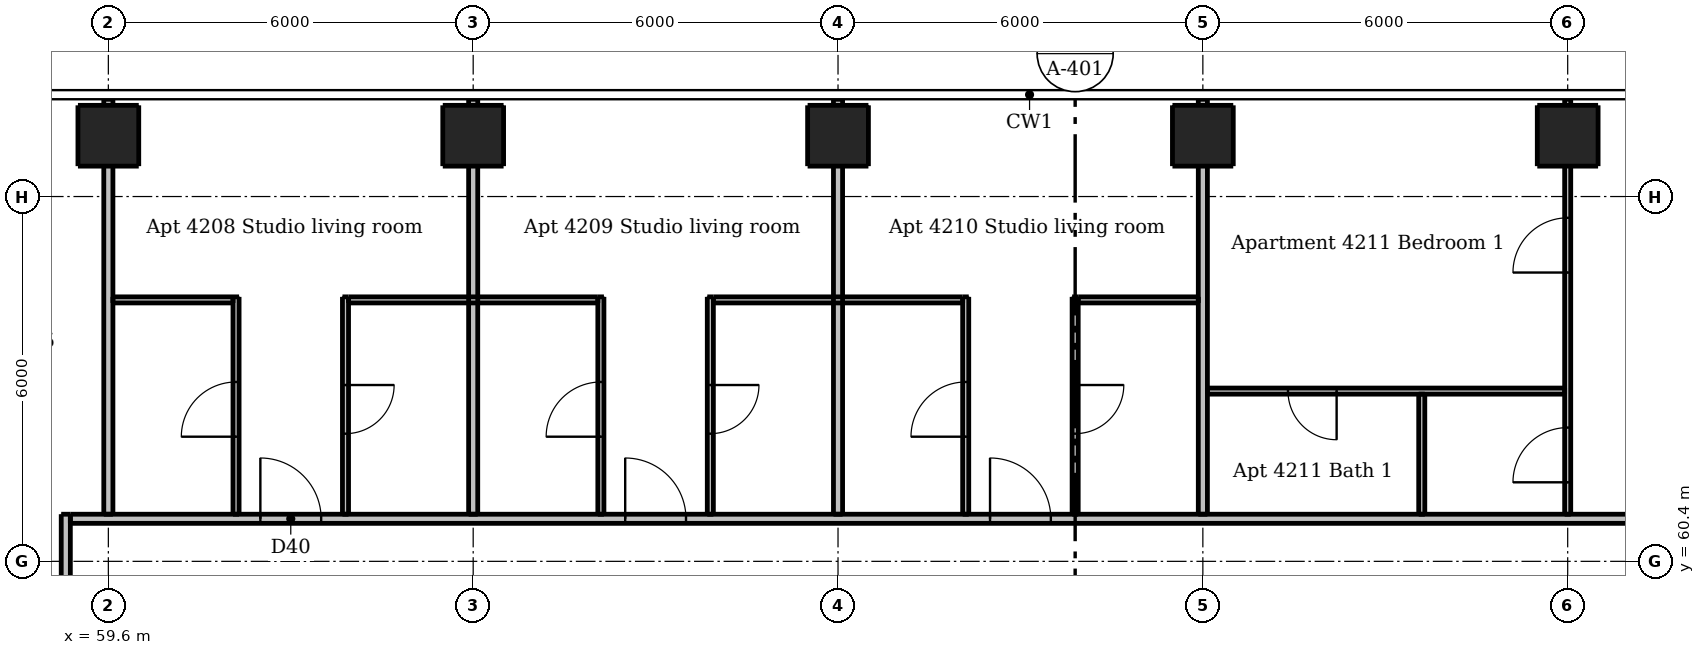
"""IFC4 building model, lengths in metres.
Left out: names, types, materials, properties, quantities, classifications, styles, units other than length and angle.
Written with IfcOpenShell. Run it as: python <this file> out.ifc"""

import sys

from ifc_helpers import new_model, si_unit, direction, frame, frame_2d, origin, origin_2d, place, context, subcontext, project, spatial, rectangle, extrude, element, fill, save


model = new_model("IFC4")
c1 = context("Model", 3, precision=1e-05, world=origin(), true_north=direction((0.0, 1.0)))
c2 = subcontext(c1, "Body", "Model", "MODEL_VIEW")
j1 = project(units=[si_unit("LENGTHUNIT", "METRE"), si_unit("PLANEANGLEUNIT", "RADIAN")], contexts=[c1])
p1 = place(None, origin())
s1 = spatial("IfcSite", under=j1, at=p1, CompositionType="ELEMENT")
p2 = place(p1, origin())
s2 = spatial("IfcBuilding", under=s1, at=p2, CompositionType="ELEMENT")
p3 = place(p2, frame((0.0, 0.0, 158.2)))
s3 = spatial("IfcBuildingStorey", under=s2, at=p3, CompositionType="ELEMENT", Elevation=158.2)
for number, where, z_axis, x_axis in (
    (1, (59.6, 67.4, 0.0), (0.0, 0.0, 1.0), (1.0, 0.0, 0.0)),
    (2, (65.6, 67.4, 0.0), (0.0, 0.0, 1.0), (1.0, 0.0, 0.0)),
    (3, (71.6, 67.4, 0.0), (0.0, 0.0, 1.0), (1.0, 0.0, 0.0)),
    (4, (77.6, 67.4, 0.0), (0.0, 0.0, 1.0), (1.0, 0.0, 0.0)),
    (5, (83.6, 67.4, 0.0), (0.0, 0.0, 1.0), (1.0, 0.0, 0.0)),
):
    element("IfcColumn", number, at=place(p3, frame(where, z_axis=z_axis, x_axis=x_axis)), inside=s3, PredefinedType="COLUMN", context=c2, shape_type="SweptSolid", body=[
        extrude(rectangle(XDim=1.0, YDim=1.0, at=origin_2d()), origin(), (0.0, 0.0, 1.0), 3.05),
    ])
p4 = place(p3, frame((61.7, 61.175, 0.0), z_axis=(0.0, 0.0, 1.0), x_axis=(0.0, 1.0, 0.0)))
e6 = element("IfcWall", 6, at=p4, inside=s3, PredefinedType="PARTITIONING", context=c2, shape_type="SweptSolid", body=[
    extrude(rectangle(XDim=3.575, YDim=0.1, at=frame_2d((1.788, 0.0))), origin(), (0.0, 0.0, 1.0), 3.05),
])
p5 = place(p4, frame((1.275, 0.0, 0.0)))
e7 = element("IfcOpeningElement", 7, at=p5, cuts=e6, PredefinedType="OPENING", context=c2, shape_type="SweptSolid", body=[
    extrude(rectangle(XDim=0.9, YDim=2.1, at=frame_2d((0.45, 1.05))), frame((0.0, 0.06, 0.0), z_axis=(0.0, -1.0, 0.0), x_axis=(1.0, 0.0, 0.0)), (0.0, 0.0, 1.0), 0.12),
])
p6 = place(p3, frame((63.5, 64.75, 0.0), z_axis=(0.0, 0.0, 1.0), x_axis=(0.0, -1.0, 0.0)))
e8 = element("IfcWall", 8, at=p6, inside=s3, PredefinedType="PARTITIONING", context=c2, shape_type="SweptSolid", body=[
    extrude(rectangle(XDim=3.575, YDim=0.1, at=frame_2d((1.788, 0.0))), origin(), (0.0, 0.0, 1.0), 3.05),
])
p7 = place(p6, frame((1.45, 0.0, 0.0)))
e9 = element("IfcOpeningElement", 9, at=p7, cuts=e8, PredefinedType="OPENING", context=c2, shape_type="SweptSolid", body=[
    extrude(rectangle(XDim=0.8, YDim=2.1, at=frame_2d((0.4, 1.05))), frame((0.0, 0.06, 0.0), z_axis=(0.0, -1.0, 0.0), x_axis=(1.0, 0.0, 0.0)), (0.0, 0.0, 1.0), 0.12),
])
p8 = place(p3, frame((67.7, 61.175, 0.0), z_axis=(0.0, 0.0, 1.0), x_axis=(0.0, 1.0, 0.0)))
e10 = element("IfcWall", 10, at=p8, inside=s3, PredefinedType="PARTITIONING", context=c2, shape_type="SweptSolid", body=[
    extrude(rectangle(XDim=3.575, YDim=0.1, at=frame_2d((1.788, 0.0))), origin(), (0.0, 0.0, 1.0), 3.05),
])
p9 = place(p8, frame((1.275, 0.0, 0.0)))
e11 = element("IfcOpeningElement", 11, at=p9, cuts=e10, PredefinedType="OPENING", context=c2, shape_type="SweptSolid", body=[
    extrude(rectangle(XDim=0.9, YDim=2.1, at=frame_2d((0.45, 1.05))), frame((0.0, 0.06, 0.0), z_axis=(0.0, -1.0, 0.0), x_axis=(1.0, 0.0, 0.0)), (0.0, 0.0, 1.0), 0.12),
])
p10 = place(p3, frame((69.5, 64.75, 0.0), z_axis=(0.0, 0.0, 1.0), x_axis=(0.0, -1.0, 0.0)))
e12 = element("IfcWall", 12, at=p10, inside=s3, PredefinedType="PARTITIONING", context=c2, shape_type="SweptSolid", body=[
    extrude(rectangle(XDim=3.575, YDim=0.1, at=frame_2d((1.788, 0.0))), origin(), (0.0, 0.0, 1.0), 3.05),
])
p11 = place(p10, frame((1.45, 0.0, 0.0)))
e13 = element("IfcOpeningElement", 13, at=p11, cuts=e12, PredefinedType="OPENING", context=c2, shape_type="SweptSolid", body=[
    extrude(rectangle(XDim=0.8, YDim=2.1, at=frame_2d((0.4, 1.05))), frame((0.0, 0.06, 0.0), z_axis=(0.0, -1.0, 0.0), x_axis=(1.0, 0.0, 0.0)), (0.0, 0.0, 1.0), 0.12),
])
p12 = place(p3, frame((73.7, 61.175, 0.0), z_axis=(0.0, 0.0, 1.0), x_axis=(0.0, 1.0, 0.0)))
e14 = element("IfcWall", 14, at=p12, inside=s3, PredefinedType="PARTITIONING", context=c2, shape_type="SweptSolid", body=[
    extrude(rectangle(XDim=3.575, YDim=0.1, at=frame_2d((1.788, 0.0))), origin(), (0.0, 0.0, 1.0), 3.05),
])
p13 = place(p12, frame((1.275, 0.0, 0.0)))
e15 = element("IfcOpeningElement", 15, at=p13, cuts=e14, PredefinedType="OPENING", context=c2, shape_type="SweptSolid", body=[
    extrude(rectangle(XDim=0.9, YDim=2.1, at=frame_2d((0.45, 1.05))), frame((0.0, 0.06, 0.0), z_axis=(0.0, -1.0, 0.0), x_axis=(1.0, 0.0, 0.0)), (0.0, 0.0, 1.0), 0.12),
])
p14 = place(p3, frame((75.5, 64.75, 0.0), z_axis=(0.0, 0.0, 1.0), x_axis=(0.0, -1.0, 0.0)))
e16 = element("IfcWall", 16, at=p14, inside=s3, PredefinedType="PARTITIONING", context=c2, shape_type="SweptSolid", body=[
    extrude(rectangle(XDim=3.575, YDim=0.1, at=frame_2d((1.788, 0.0))), origin(), (0.0, 0.0, 1.0), 3.05),
])
p15 = place(p14, frame((1.45, 0.0, 0.0)))
e17 = element("IfcOpeningElement", 17, at=p15, cuts=e16, PredefinedType="OPENING", context=c2, shape_type="SweptSolid", body=[
    extrude(rectangle(XDim=0.8, YDim=2.1, at=frame_2d((0.4, 1.05))), frame((0.0, 0.06, 0.0), z_axis=(0.0, -1.0, 0.0), x_axis=(1.0, 0.0, 0.0)), (0.0, 0.0, 1.0), 0.12),
])
p16 = place(p3, frame((81.2, 61.175, 0.0), z_axis=(0.0, 0.0, 1.0), x_axis=(0.0, 1.0, 0.0)))
e18 = element("IfcWall", 18, at=p16, inside=s3, PredefinedType="PARTITIONING", context=c2, shape_type="SweptSolid", body=[
    extrude(rectangle(XDim=1.975, YDim=0.1, at=frame_2d((0.987, 0.0))), origin(), (0.0, 0.0, 1.0), 3.05),
])
p17 = place(p3, frame((83.6, 61.175, 0.0), z_axis=(0.0, 0.0, 1.0), x_axis=(0.0, 1.0, 0.0)))
e19 = element("IfcWall", 19, at=p17, inside=s3, PredefinedType="PARTITIONING", context=c2, shape_type="SweptSolid", body=[
    extrude(rectangle(XDim=6.825, YDim=0.1, at=frame_2d((3.413, 0.0))), origin(), (0.0, 0.0, 1.0), 2.516),
])
p18 = place(p17, frame((0.525, 0.0, 0.0)))
e20 = element("IfcOpeningElement", 20, at=p18, cuts=e19, PredefinedType="OPENING", context=c2, shape_type="SweptSolid", body=[
    extrude(rectangle(XDim=0.9, YDim=2.1, at=frame_2d((0.45, 1.05))), frame((0.0, 0.06, 0.0), z_axis=(0.0, -1.0, 0.0), x_axis=(1.0, 0.0, 0.0)), (0.0, 0.0, 1.0), 0.12),
])
p19 = place(p17, frame((3.975, 0.0, 0.0)))
e21 = element("IfcOpeningElement", 21, at=p19, cuts=e19, PredefinedType="OPENING", context=c2, shape_type="SweptSolid", body=[
    extrude(rectangle(XDim=0.9, YDim=2.1, at=frame_2d((0.45, 1.05))), frame((0.0, 0.06, 0.0), z_axis=(0.0, -1.0, 0.0), x_axis=(1.0, 0.0, 0.0)), (0.0, 0.0, 1.0), 0.12),
])
p20 = place(p3, frame((59.675, 64.7, 0.0), z_axis=(0.0, 0.0, 1.0), x_axis=(1.0, 0.0, 0.0)))
e22 = element("IfcWall", 22, at=p20, inside=s3, PredefinedType="PARTITIONING", context=c2, shape_type="SweptSolid", body=[
    extrude(rectangle(XDim=1.975, YDim=0.1, at=frame_2d((0.987, 0.0))), origin(), (0.0, 0.0, 1.0), 3.05),
])
for number, where, z_axis, x_axis in (
    (23, (63.55, 64.7, 0.0), (0.0, 0.0, 1.0), (1.0, 0.0, 0.0)),
    (24, (69.55, 64.7, 0.0), (0.0, 0.0, 1.0), (1.0, 0.0, 0.0)),
):
    element("IfcWall", number, at=place(p3, frame(where, z_axis=z_axis, x_axis=x_axis)), inside=s3, PredefinedType="PARTITIONING", context=c2, shape_type="SweptSolid", body=[
        extrude(rectangle(XDim=4.1, YDim=0.1, at=frame_2d((2.05, 0.0))), origin(), (0.0, 0.0, 1.0), 3.05),
    ])
p21 = place(p3, frame((75.55, 64.7, 0.0), z_axis=(0.0, 0.0, 1.0), x_axis=(1.0, 0.0, 0.0)))
e25 = element("IfcWall", 25, at=p21, inside=s3, PredefinedType="PARTITIONING", context=c2, shape_type="SweptSolid", body=[
    extrude(rectangle(XDim=1.975, YDim=0.1, at=frame_2d((0.987, 0.0))), origin(), (0.0, 0.0, 1.0), 3.05),
])
p22 = place(p3, frame((83.55, 63.2, 0.0), z_axis=(0.0, 0.0, 1.0), x_axis=(-1.0, 0.0, 0.0)))
e26 = element("IfcWall", 26, at=p22, inside=s3, PredefinedType="PARTITIONING", context=c2, shape_type="SweptSolid", body=[
    extrude(rectangle(XDim=5.875, YDim=0.1, at=frame_2d((2.938, 0.0))), origin(), (0.0, 0.0, 1.0), 3.05),
])
p23 = place(p22, frame((3.75, 0.0, 0.0)))
e27 = element("IfcOpeningElement", 27, at=p23, cuts=e26, PredefinedType="OPENING", context=c2, shape_type="SweptSolid", body=[
    extrude(rectangle(XDim=0.8, YDim=2.1, at=frame_2d((0.4, 1.05))), frame((0.0, 0.06, 0.0), z_axis=(0.0, -1.0, 0.0), x_axis=(1.0, 0.0, 0.0)), (0.0, 0.0, 1.0), 0.12),
])
p24 = place(p3, frame((58.9, 30.325, 0.0), z_axis=(0.0, 0.0, 1.0), x_axis=(0.0, 1.0, 0.0)))
e28 = element("IfcWall", 28, at=p24, inside=s3, PredefinedType="PARTITIONING", context=c2, shape_type="SweptSolid", body=[
    extrude(rectangle(XDim=30.85, YDim=0.15, at=frame_2d((15.425, 0.0))), origin(), (0.0, 0.0, 1.0), 3.05),
])
p25 = place(p24, frame((2.575, 0.0, 0.0)))
e29 = element("IfcOpeningElement", 29, at=p25, cuts=e28, PredefinedType="OPENING", context=c2, shape_type="SweptSolid", body=[
    extrude(rectangle(XDim=1.0, YDim=2.1, at=frame_2d((0.5, 1.05))), frame((0.0, 0.085, 0.0), z_axis=(0.0, -1.0, 0.0), x_axis=(1.0, 0.0, 0.0)), (0.0, 0.0, 1.0), 0.17),
])
p26 = place(p24, frame((8.575, 0.0, 0.0)))
e30 = element("IfcOpeningElement", 30, at=p26, cuts=e28, PredefinedType="OPENING", context=c2, shape_type="SweptSolid", body=[
    extrude(rectangle(XDim=1.0, YDim=2.1, at=frame_2d((0.5, 1.05))), frame((0.0, 0.085, 0.0), z_axis=(0.0, -1.0, 0.0), x_axis=(1.0, 0.0, 0.0)), (0.0, 0.0, 1.0), 0.17),
])
p27 = place(p24, frame((14.575, 0.0, 0.0)))
e31 = element("IfcOpeningElement", 31, at=p27, cuts=e28, PredefinedType="OPENING", context=c2, shape_type="SweptSolid", body=[
    extrude(rectangle(XDim=1.0, YDim=2.1, at=frame_2d((0.5, 1.05))), frame((0.0, 0.085, 0.0), z_axis=(0.0, -1.0, 0.0), x_axis=(1.0, 0.0, 0.0)), (0.0, 0.0, 1.0), 0.17),
])
p28 = place(p24, frame((26.925, 0.0, 0.0)))
e32 = element("IfcOpeningElement", 32, at=p28, cuts=e28, PredefinedType="OPENING", context=c2, shape_type="SweptSolid", body=[
    extrude(rectangle(XDim=1.0, YDim=2.1, at=frame_2d((0.5, 1.05))), frame((0.0, 0.085, 0.0), z_axis=(0.0, -1.0, 0.0), x_axis=(1.0, 0.0, 0.0)), (0.0, 0.0, 1.0), 0.17),
])
p29 = place(p3, frame((59.6, 61.175, 0.0), z_axis=(0.0, 0.0, 1.0), x_axis=(0.0, 1.0, 0.0)))
e33 = element("IfcWall", 33, at=p29, inside=s3, PredefinedType="PARTITIONING", context=c2, shape_type="SweptSolid", body=[
    extrude(rectangle(XDim=6.825, YDim=0.15, at=frame_2d((3.413, 0.0))), origin(), (0.0, 0.0, 1.0), 2.51),
])
for number, where, z_axis, x_axis in (
    (34, (65.6, 61.175, 0.0), (0.0, 0.0, 1.0), (0.0, 1.0, 0.0)),
    (35, (71.6, 61.175, 0.0), (0.0, 0.0, 1.0), (0.0, 1.0, 0.0)),
    (36, (77.6, 61.175, 0.0), (0.0, 0.0, 1.0), (0.0, 1.0, 0.0)),
):
    element("IfcWall", number, at=place(p3, frame(where, z_axis=z_axis, x_axis=x_axis)), inside=s3, PredefinedType="PARTITIONING", context=c2, shape_type="SweptSolid", body=[
        extrude(rectangle(XDim=6.825, YDim=0.15, at=frame_2d((3.413, 0.0))), origin(), (0.0, 0.0, 1.0), 2.516),
    ])
p30 = place(p3, frame((58.975, 61.1, 0.0), z_axis=(0.0, 0.0, 1.0), x_axis=(1.0, 0.0, 0.0)))
e37 = element("IfcWall", 37, at=p30, inside=s3, PredefinedType="PARTITIONING", context=c2, shape_type="SweptSolid", body=[
    extrude(rectangle(XDim=29.25, YDim=0.15, at=frame_2d((14.625, 0.0))), origin(), (0.0, 0.0, 1.0), 3.05),
])
p31 = place(p30, frame((3.125, 0.0, 0.0)))
e38 = element("IfcOpeningElement", 38, at=p31, cuts=e37, PredefinedType="OPENING", context=c2, shape_type="SweptSolid", body=[
    extrude(rectangle(XDim=1.0, YDim=2.1, at=frame_2d((0.5, 1.05))), frame((0.0, 0.085, 0.0), z_axis=(0.0, -1.0, 0.0), x_axis=(1.0, 0.0, 0.0)), (0.0, 0.0, 1.0), 0.17),
])
p32 = place(p30, frame((9.125, 0.0, 0.0)))
e39 = element("IfcOpeningElement", 39, at=p32, cuts=e37, PredefinedType="OPENING", context=c2, shape_type="SweptSolid", body=[
    extrude(rectangle(XDim=1.0, YDim=2.1, at=frame_2d((0.5, 1.05))), frame((0.0, 0.085, 0.0), z_axis=(0.0, -1.0, 0.0), x_axis=(1.0, 0.0, 0.0)), (0.0, 0.0, 1.0), 0.17),
])
p33 = place(p30, frame((15.125, 0.0, 0.0)))
e40 = element("IfcOpeningElement", 40, at=p33, cuts=e37, PredefinedType="OPENING", context=c2, shape_type="SweptSolid", body=[
    extrude(rectangle(XDim=1.0, YDim=2.1, at=frame_2d((0.5, 1.05))), frame((0.0, 0.085, 0.0), z_axis=(0.0, -1.0, 0.0), x_axis=(1.0, 0.0, 0.0)), (0.0, 0.0, 1.0), 0.17),
])
p34 = place(p30, frame((26.475, 0.0, 0.0)))
e41 = element("IfcOpeningElement", 41, at=p34, cuts=e37, PredefinedType="OPENING", context=c2, shape_type="SweptSolid", body=[
    extrude(rectangle(XDim=1.0, YDim=2.1, at=frame_2d((0.5, 1.05))), frame((0.0, 0.085, 0.0), z_axis=(0.0, -1.0, 0.0), x_axis=(1.0, 0.0, 0.0)), (0.0, 0.0, 1.0), 0.17),
])
p35 = place(p31, origin())
e42 = element("IfcDoor", 42, at=p35, inside=s3, OperationType="SINGLE_SWING_LEFT", PredefinedType="DOOR", context=c2, shape_type="SweptSolid", body=[
    extrude(rectangle(XDim=1.0, YDim=2.1, at=frame_2d((0.5, 1.05))), frame((0.0, 0.025, 0.0), z_axis=(0.0, -1.0, 0.0), x_axis=(1.0, 0.0, 0.0)), (0.0, 0.0, 1.0), 0.05),
])
fill(e38, e42)
p36 = place(p5, origin())
e43 = element("IfcDoor", 43, at=p36, inside=s3, OperationType="SINGLE_SWING_LEFT", PredefinedType="DOOR", context=c2, shape_type="SweptSolid", body=[
    extrude(rectangle(XDim=0.9, YDim=2.1, at=frame_2d((0.45, 1.05))), frame((0.0, 0.025, 0.0), z_axis=(0.0, -1.0, 0.0), x_axis=(1.0, 0.0, 0.0)), (0.0, 0.0, 1.0), 0.05),
])
fill(e7, e43)
p37 = place(p7, origin())
e44 = element("IfcDoor", 44, at=p37, inside=s3, OperationType="SINGLE_SWING_LEFT", PredefinedType="DOOR", context=c2, shape_type="SweptSolid", body=[
    extrude(rectangle(XDim=0.8, YDim=2.1, at=frame_2d((0.4, 1.05))), frame((0.0, 0.025, 0.0), z_axis=(0.0, -1.0, 0.0), x_axis=(1.0, 0.0, 0.0)), (0.0, 0.0, 1.0), 0.05),
])
fill(e9, e44)
p38 = place(p32, origin())
e45 = element("IfcDoor", 45, at=p38, inside=s3, OperationType="SINGLE_SWING_LEFT", PredefinedType="DOOR", context=c2, shape_type="SweptSolid", body=[
    extrude(rectangle(XDim=1.0, YDim=2.1, at=frame_2d((0.5, 1.05))), frame((0.0, 0.025, 0.0), z_axis=(0.0, -1.0, 0.0), x_axis=(1.0, 0.0, 0.0)), (0.0, 0.0, 1.0), 0.05),
])
fill(e39, e45)
p39 = place(p9, origin())
e46 = element("IfcDoor", 46, at=p39, inside=s3, OperationType="SINGLE_SWING_LEFT", PredefinedType="DOOR", context=c2, shape_type="SweptSolid", body=[
    extrude(rectangle(XDim=0.9, YDim=2.1, at=frame_2d((0.45, 1.05))), frame((0.0, 0.025, 0.0), z_axis=(0.0, -1.0, 0.0), x_axis=(1.0, 0.0, 0.0)), (0.0, 0.0, 1.0), 0.05),
])
fill(e11, e46)
p40 = place(p11, origin())
e47 = element("IfcDoor", 47, at=p40, inside=s3, OperationType="SINGLE_SWING_LEFT", PredefinedType="DOOR", context=c2, shape_type="SweptSolid", body=[
    extrude(rectangle(XDim=0.8, YDim=2.1, at=frame_2d((0.4, 1.05))), frame((0.0, 0.025, 0.0), z_axis=(0.0, -1.0, 0.0), x_axis=(1.0, 0.0, 0.0)), (0.0, 0.0, 1.0), 0.05),
])
fill(e13, e47)
p41 = place(p33, origin())
e48 = element("IfcDoor", 48, at=p41, inside=s3, OperationType="SINGLE_SWING_LEFT", PredefinedType="DOOR", context=c2, shape_type="SweptSolid", body=[
    extrude(rectangle(XDim=1.0, YDim=2.1, at=frame_2d((0.5, 1.05))), frame((0.0, 0.025, 0.0), z_axis=(0.0, -1.0, 0.0), x_axis=(1.0, 0.0, 0.0)), (0.0, 0.0, 1.0), 0.05),
])
fill(e40, e48)
p42 = place(p13, origin())
e49 = element("IfcDoor", 49, at=p42, inside=s3, OperationType="SINGLE_SWING_LEFT", PredefinedType="DOOR", context=c2, shape_type="SweptSolid", body=[
    extrude(rectangle(XDim=0.9, YDim=2.1, at=frame_2d((0.45, 1.05))), frame((0.0, 0.025, 0.0), z_axis=(0.0, -1.0, 0.0), x_axis=(1.0, 0.0, 0.0)), (0.0, 0.0, 1.0), 0.05),
])
fill(e15, e49)
p43 = place(p15, origin())
e50 = element("IfcDoor", 50, at=p43, inside=s3, OperationType="SINGLE_SWING_LEFT", PredefinedType="DOOR", context=c2, shape_type="SweptSolid", body=[
    extrude(rectangle(XDim=0.8, YDim=2.1, at=frame_2d((0.4, 1.05))), frame((0.0, 0.025, 0.0), z_axis=(0.0, -1.0, 0.0), x_axis=(1.0, 0.0, 0.0)), (0.0, 0.0, 1.0), 0.05),
])
fill(e17, e50)
p44 = place(p18, origin())
e51 = element("IfcDoor", 51, at=p44, inside=s3, OperationType="SINGLE_SWING_LEFT", PredefinedType="DOOR", context=c2, shape_type="SweptSolid", body=[
    extrude(rectangle(XDim=0.9, YDim=2.1, at=frame_2d((0.45, 1.05))), frame((0.0, 0.025, 0.0), z_axis=(0.0, -1.0, 0.0), x_axis=(1.0, 0.0, 0.0)), (0.0, 0.0, 1.0), 0.05),
])
fill(e20, e51)
p45 = place(p19, origin())
e52 = element("IfcDoor", 52, at=p45, inside=s3, OperationType="SINGLE_SWING_LEFT", PredefinedType="DOOR", context=c2, shape_type="SweptSolid", body=[
    extrude(rectangle(XDim=0.9, YDim=2.1, at=frame_2d((0.45, 1.05))), frame((0.0, 0.025, 0.0), z_axis=(0.0, -1.0, 0.0), x_axis=(1.0, 0.0, 0.0)), (0.0, 0.0, 1.0), 0.05),
])
fill(e21, e52)
p46 = place(p23, origin())
e53 = element("IfcDoor", 53, at=p46, inside=s3, OperationType="SINGLE_SWING_LEFT", PredefinedType="DOOR", context=c2, shape_type="SweptSolid", body=[
    extrude(rectangle(XDim=0.8, YDim=2.1, at=frame_2d((0.4, 1.05))), frame((0.0, 0.025, 0.0), z_axis=(0.0, -1.0, 0.0), x_axis=(1.0, 0.0, 0.0)), (0.0, 0.0, 1.0), 0.05),
])
fill(e27, e53)
save(model, sys.argv[1])
